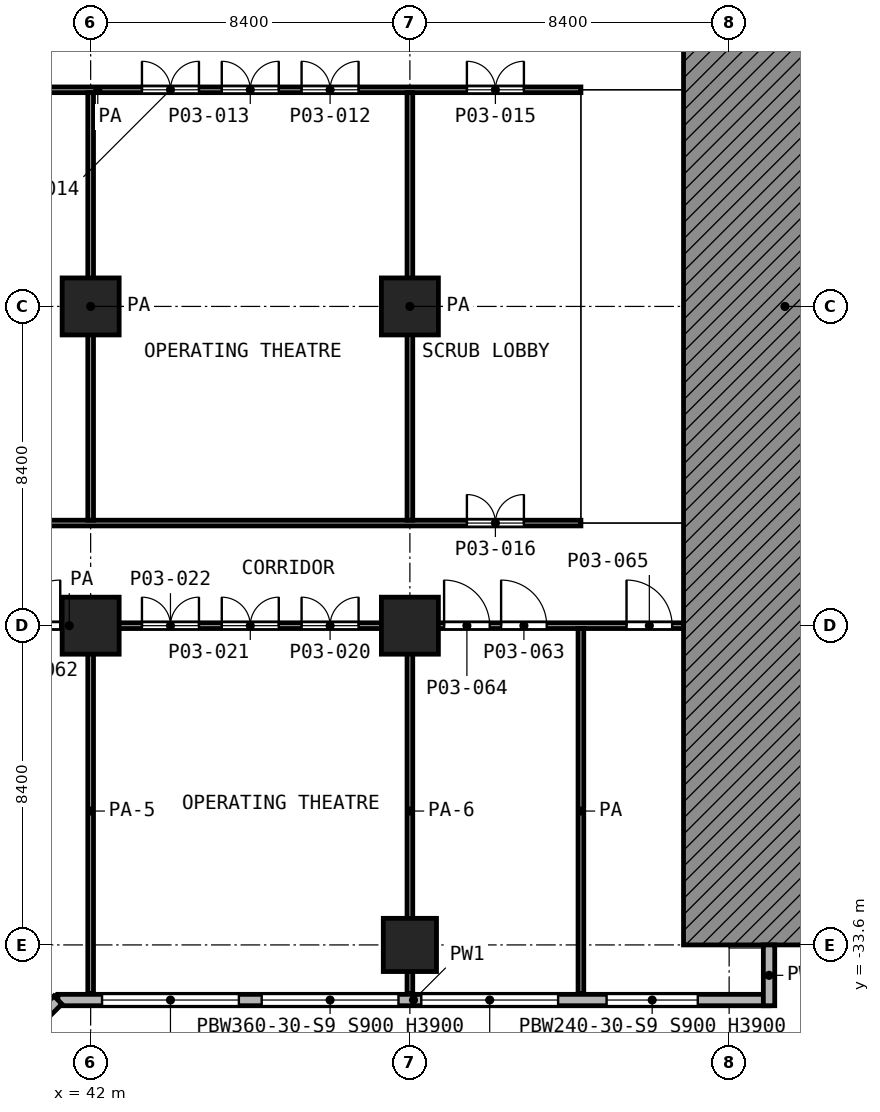
"""IFC4 building model, lengths in metres.
Left out: names, types, materials, properties, quantities, classifications, styles, units other than length and angle.
Written with IfcOpenShell. Run it as: python <this file> out.ifc"""

import sys

from ifc_helpers import new_model, si_unit, direction, frame, frame_2d, origin, origin_2d, place, context, subcontext, project, spatial, polyline, rectangle, outline, extrude, element, fill, save


model = new_model("IFC4")
c1 = context("Model", 3, precision=1e-05, world=origin(), true_north=direction((0.0, 1.0)))
c2 = subcontext(c1, "Body", "Model", "MODEL_VIEW")
j1 = project(units=[si_unit("LENGTHUNIT", "METRE"), si_unit("PLANEANGLEUNIT", "RADIAN")], contexts=[c1])
p1 = place(None, origin())
s1 = spatial("IfcSite", under=j1, at=p1, CompositionType="ELEMENT")
p2 = place(p1, origin())
s2 = spatial("IfcBuilding", under=s1, at=p2, CompositionType="ELEMENT")
p3 = place(p2, frame((0.0, 0.0, 12.6)))
s3 = spatial("IfcBuildingStorey", under=s2, at=p3, CompositionType="ELEMENT", Elevation=12.6)
for number, where, z_axis, x_axis in (
    (1, (42.0, -16.8, 0.0), (0.0, 0.0, 1.0), (1.0, 0.0, 0.0)),
    (2, (50.4, -16.8, 0.0), (0.0, 0.0, 1.0), (1.0, 0.0, 0.0)),
    (3, (42.0, -25.2, 0.0), (0.0, 0.0, 1.0), (1.0, 0.0, 0.0)),
    (4, (50.4, -25.2, 0.0), (0.0, 0.0, 1.0), (1.0, 0.0, 0.0)),
):
    element("IfcColumn", number, at=place(p3, frame(where, z_axis=z_axis, x_axis=x_axis)), inside=s3, PredefinedType="COLUMN", context=c2, shape_type="SweptSolid", body=[
        extrude(rectangle(XDim=1.5, YDim=1.5, at=origin_2d()), origin(), (0.0, 0.0, 1.0), 5.6),
    ])
p4 = place(p3, frame((50.4, -33.6, 0.0), z_axis=(0.0, 0.0, 1.0), x_axis=(1.0, 0.0, 0.0)))
e5 = element("IfcColumn", 5, at=p4, inside=s3, PredefinedType="COLUMN", context=c2, shape_type="SweptSolid", body=[
    extrude(rectangle(XDim=1.4, YDim=1.4, at=origin_2d()), origin(), (0.0, 0.0, 1.0), 5.6),
])
p5 = place(p3, frame((0.0, 0.0, -12.6), z_axis=(0.0, -1.0, 0.0), x_axis=(1.0, 0.0, 0.0)))
e6 = element("IfcWall", 6, at=p5, inside=s3, PredefinedType="SHEAR", context=c2, shape_type="SweptSolid", body=[
    extrude(outline(polyline([(62.938, 18.2), (62.484, 17.583), (61.414, 15.591), (60.634, 13.468), (60.448, 12.6), (57.6, 12.6), (57.6, 18.2), (62.938, 18.2)])), origin(), (0.0, 0.0, 1.0), 33.6),
])
p6 = place(p3, frame((35.05, -41.138, 0.0), z_axis=(0.0, 0.0, 1.0), x_axis=(0.707106781187, 0.707106781187, 0.0)))
e7 = element("IfcWall", 7, at=p6, inside=s3, PredefinedType="SOLIDWALL", context=c2, shape_type="SweptSolid", body=[
    extrude(rectangle(XDim=8.61, YDim=0.3, at=frame_2d((4.305, 0.0))), origin(), (0.0, 0.0, 1.0), 5.25),
])
p7 = place(p6, frame((2.34, 0.0, 0.9)))
e8 = element("IfcOpeningElement", 8, at=p7, cuts=e7, PredefinedType="OPENING", context=c2, shape_type="SweptSolid", body=[
    extrude(rectangle(XDim=1.2, YDim=3.0, at=frame_2d((0.6, 1.5))), frame((0.0, 0.16, 0.0), z_axis=(0.0, -1.0, 0.0), x_axis=(1.0, 0.0, 0.0)), (0.0, 0.0, 1.0), 0.32),
])
p8 = place(p6, frame((5.593, 0.0, 0.9)))
e9 = element("IfcOpeningElement", 9, at=p8, cuts=e7, PredefinedType="OPENING", context=c2, shape_type="SweptSolid", body=[
    extrude(rectangle(XDim=2.4, YDim=3.0, at=frame_2d((1.2, 1.5))), frame((0.0, 0.16, 0.0), z_axis=(0.0, -1.0, 0.0), x_axis=(1.0, 0.0, 0.0)), (0.0, 0.0, 1.0), 0.32),
])
p9 = place(p3, frame((41.138, -35.05, 0.0), z_axis=(0.0, 0.0, 1.0), x_axis=(1.0, 0.0, 0.0)))
e10 = element("IfcWall", 10, at=p9, inside=s3, PredefinedType="SOLIDWALL", context=c2, shape_type="SweptSolid", body=[
    extrude(rectangle(XDim=18.712, YDim=0.3, at=frame_2d((9.356, 0.0))), origin(), (0.0, 0.0, 1.0), 5.25),
])
p10 = place(p9, frame((1.162, 0.0, 0.9)))
e11 = element("IfcOpeningElement", 11, at=p10, cuts=e10, PredefinedType="OPENING", context=c2, shape_type="SweptSolid", body=[
    extrude(rectangle(XDim=3.6, YDim=3.0, at=frame_2d((1.8, 1.5))), frame((0.0, 0.16, 0.0), z_axis=(0.0, -1.0, 0.0), x_axis=(1.0, 0.0, 0.0)), (0.0, 0.0, 1.0), 0.32),
])
p11 = place(p9, frame((5.362, 0.0, 0.9)))
e12 = element("IfcOpeningElement", 12, at=p11, cuts=e10, PredefinedType="OPENING", context=c2, shape_type="SweptSolid", body=[
    extrude(rectangle(XDim=3.6, YDim=3.0, at=frame_2d((1.8, 1.5))), frame((0.0, 0.16, 0.0), z_axis=(0.0, -1.0, 0.0), x_axis=(1.0, 0.0, 0.0)), (0.0, 0.0, 1.0), 0.32),
])
p12 = place(p9, frame((9.562, 0.0, 0.9)))
e13 = element("IfcOpeningElement", 13, at=p12, cuts=e10, PredefinedType="OPENING", context=c2, shape_type="SweptSolid", body=[
    extrude(rectangle(XDim=3.6, YDim=3.0, at=frame_2d((1.8, 1.5))), frame((0.0, 0.16, 0.0), z_axis=(0.0, -1.0, 0.0), x_axis=(1.0, 0.0, 0.0)), (0.0, 0.0, 1.0), 0.32),
])
p13 = place(p9, frame((14.437, 0.0, 0.9)))
e14 = element("IfcOpeningElement", 14, at=p13, cuts=e10, PredefinedType="OPENING", context=c2, shape_type="SweptSolid", body=[
    extrude(rectangle(XDim=2.4, YDim=3.0, at=frame_2d((1.2, 1.5))), frame((0.0, 0.16, 0.0), z_axis=(0.0, -1.0, 0.0), x_axis=(1.0, 0.0, 0.0)), (0.0, 0.0, 1.0), 0.32),
])
p14 = place(p3, frame((59.85, -35.2, 0.0), z_axis=(0.0, 0.0, 1.0), x_axis=(0.0, 1.0, 0.0)))
e15 = element("IfcWall", 15, at=p14, inside=s3, PredefinedType="SOLIDWALL", context=c2, shape_type="SweptSolid", body=[
    extrude(rectangle(XDim=1.6, YDim=0.3, at=frame_2d((0.8, 0.0))), origin(), (0.0, 0.0, 1.0), 5.25),
])
p15 = place(p3, frame((25.275, -25.2, 0.0), z_axis=(0.0, 0.0, 1.0), x_axis=(1.0, 0.0, 0.0)))
e16 = element("IfcWall", 16, at=p15, inside=s3, PredefinedType="PARTITIONING", context=c2, shape_type="SweptSolid", body=[
    extrude(rectangle(XDim=32.325, YDim=0.15, at=frame_2d((16.163, 0.0))), origin(), (0.0, 0.0, 1.0), 5.25),
])
p16 = place(p15, frame((5.625, 0.0, 0.0)))
e17 = element("IfcOpeningElement", 17, at=p16, cuts=e16, PredefinedType="OPENING", context=c2, shape_type="SweptSolid", body=[
    extrude(rectangle(XDim=1.2, YDim=2.1, at=frame_2d((0.6, 1.05))), frame((0.0, 0.085, 0.0), z_axis=(0.0, -1.0, 0.0), x_axis=(1.0, 0.0, 0.0)), (0.0, 0.0, 1.0), 0.17),
])
p17 = place(p15, frame((10.125, 0.0, 0.0)))
e18 = element("IfcOpeningElement", 18, at=p17, cuts=e16, PredefinedType="OPENING", context=c2, shape_type="SweptSolid", body=[
    extrude(rectangle(XDim=1.2, YDim=2.1, at=frame_2d((0.6, 1.05))), frame((0.0, 0.085, 0.0), z_axis=(0.0, -1.0, 0.0), x_axis=(1.0, 0.0, 0.0)), (0.0, 0.0, 1.0), 0.17),
])
p18 = place(p15, frame((14.725, 0.0, 0.0)))
e19 = element("IfcOpeningElement", 19, at=p18, cuts=e16, PredefinedType="OPENING", context=c2, shape_type="SweptSolid", body=[
    extrude(rectangle(XDim=1.2, YDim=2.1, at=frame_2d((0.6, 1.05))), frame((0.0, 0.085, 0.0), z_axis=(0.0, -1.0, 0.0), x_axis=(1.0, 0.0, 0.0)), (0.0, 0.0, 1.0), 0.17),
])
p19 = place(p15, frame((13.325, 0.0, 0.0)))
e20 = element("IfcOpeningElement", 20, at=p19, cuts=e16, PredefinedType="OPENING", context=c2, shape_type="SweptSolid", body=[
    extrude(rectangle(XDim=1.1, YDim=2.1, at=frame_2d((0.55, 1.05))), frame((0.0, 0.085, 0.0), z_axis=(0.0, -1.0, 0.0), x_axis=(1.0, 0.0, 0.0)), (0.0, 0.0, 1.0), 0.17),
])
p20 = place(p15, frame((22.275, 0.0, 0.0)))
e21 = element("IfcOpeningElement", 21, at=p20, cuts=e16, PredefinedType="OPENING", context=c2, shape_type="SweptSolid", body=[
    extrude(rectangle(XDim=1.5, YDim=2.1, at=frame_2d((0.75, 1.05))), frame((0.0, 0.085, 0.0), z_axis=(0.0, -1.0, 0.0), x_axis=(1.0, 0.0, 0.0)), (0.0, 0.0, 1.0), 0.17),
])
p21 = place(p15, frame((20.175, 0.0, 0.0)))
e22 = element("IfcOpeningElement", 22, at=p21, cuts=e16, PredefinedType="OPENING", context=c2, shape_type="SweptSolid", body=[
    extrude(rectangle(XDim=1.5, YDim=2.1, at=frame_2d((0.75, 1.05))), frame((0.0, 0.085, 0.0), z_axis=(0.0, -1.0, 0.0), x_axis=(1.0, 0.0, 0.0)), (0.0, 0.0, 1.0), 0.17),
])
p22 = place(p15, frame((18.075, 0.0, 0.0)))
e23 = element("IfcOpeningElement", 23, at=p22, cuts=e16, PredefinedType="OPENING", context=c2, shape_type="SweptSolid", body=[
    extrude(rectangle(XDim=1.5, YDim=2.1, at=frame_2d((0.75, 1.05))), frame((0.0, 0.085, 0.0), z_axis=(0.0, -1.0, 0.0), x_axis=(1.0, 0.0, 0.0)), (0.0, 0.0, 1.0), 0.17),
])
p23 = place(p15, frame((27.525, 0.0, 0.0)))
e24 = element("IfcOpeningElement", 24, at=p23, cuts=e16, PredefinedType="OPENING", context=c2, shape_type="SweptSolid", body=[
    extrude(rectangle(XDim=1.2, YDim=2.1, at=frame_2d((0.6, 1.05))), frame((0.0, 0.085, 0.0), z_axis=(0.0, -1.0, 0.0), x_axis=(1.0, 0.0, 0.0)), (0.0, 0.0, 1.0), 0.17),
])
p24 = place(p15, frame((26.025, 0.0, 0.0)))
e25 = element("IfcOpeningElement", 25, at=p24, cuts=e16, PredefinedType="OPENING", context=c2, shape_type="SweptSolid", body=[
    extrude(rectangle(XDim=1.2, YDim=2.1, at=frame_2d((0.6, 1.05))), frame((0.0, 0.085, 0.0), z_axis=(0.0, -1.0, 0.0), x_axis=(1.0, 0.0, 0.0)), (0.0, 0.0, 1.0), 0.17),
])
p25 = place(p15, frame((30.825, 0.0, 0.0)))
e26 = element("IfcOpeningElement", 26, at=p25, cuts=e16, PredefinedType="OPENING", context=c2, shape_type="SweptSolid", body=[
    extrude(rectangle(XDim=1.2, YDim=2.1, at=frame_2d((0.6, 1.05))), frame((0.0, 0.085, 0.0), z_axis=(0.0, -1.0, 0.0), x_axis=(1.0, 0.0, 0.0)), (0.0, 0.0, 1.0), 0.17),
])
p26 = place(p3, frame((25.2, -22.5, 0.0), z_axis=(0.0, 0.0, 1.0), x_axis=(1.0, 0.0, 0.0)))
e27 = element("IfcWall", 27, at=p26, inside=s3, PredefinedType="PARTITIONING", context=c2, shape_type="SweptSolid", body=[
    extrude(rectangle(XDim=29.7, YDim=0.15, at=frame_2d((14.85, 0.0))), origin(), (0.0, 0.0, 1.0), 5.25),
])
p27 = place(p26, frame((12.1, 0.0, 0.0)))
e28 = element("IfcOpeningElement", 28, at=p27, cuts=e27, PredefinedType="OPENING", context=c2, shape_type="SweptSolid", body=[
    extrude(rectangle(XDim=1.0, YDim=2.1, at=frame_2d((0.5, 1.05))), frame((0.0, 0.085, 0.0), z_axis=(0.0, -1.0, 0.0), x_axis=(1.0, 0.0, 0.0)), (0.0, 0.0, 1.0), 0.17),
])
p28 = place(p26, frame((26.7, 0.0, 0.0)))
e29 = element("IfcOpeningElement", 29, at=p28, cuts=e27, PredefinedType="OPENING", context=c2, shape_type="SweptSolid", body=[
    extrude(rectangle(XDim=1.5, YDim=2.1, at=frame_2d((0.75, 1.05))), frame((0.0, 0.085, 0.0), z_axis=(0.0, -1.0, 0.0), x_axis=(1.0, 0.0, 0.0)), (0.0, 0.0, 1.0), 0.17),
])
p29 = place(p3, frame((29.475, -11.1, 0.0), z_axis=(0.0, 0.0, 1.0), x_axis=(1.0, 0.0, 0.0)))
e30 = element("IfcWall", 30, at=p29, inside=s3, PredefinedType="PARTITIONING", context=c2, shape_type="SweptSolid", body=[
    extrude(rectangle(XDim=25.425, YDim=0.15, at=frame_2d((12.712, 0.0))), origin(), (0.0, 0.0, 1.0), 5.25),
])
p30 = place(p29, frame((18.075, 0.0, 0.0)))
e31 = element("IfcOpeningElement", 31, at=p30, cuts=e30, PredefinedType="OPENING", context=c2, shape_type="SweptSolid", body=[
    extrude(rectangle(XDim=1.5, YDim=2.1, at=frame_2d((0.75, 1.05))), frame((0.0, 0.085, 0.0), z_axis=(0.0, -1.0, 0.0), x_axis=(1.0, 0.0, 0.0)), (0.0, 0.0, 1.0), 0.17),
])
p31 = place(p29, frame((15.975, 0.0, 0.0)))
e32 = element("IfcOpeningElement", 32, at=p31, cuts=e30, PredefinedType="OPENING", context=c2, shape_type="SweptSolid", body=[
    extrude(rectangle(XDim=1.5, YDim=2.1, at=frame_2d((0.75, 1.05))), frame((0.0, 0.085, 0.0), z_axis=(0.0, -1.0, 0.0), x_axis=(1.0, 0.0, 0.0)), (0.0, 0.0, 1.0), 0.17),
])
p32 = place(p29, frame((13.875, 0.0, 0.0)))
e33 = element("IfcOpeningElement", 33, at=p32, cuts=e30, PredefinedType="OPENING", context=c2, shape_type="SweptSolid", body=[
    extrude(rectangle(XDim=1.5, YDim=2.1, at=frame_2d((0.75, 1.05))), frame((0.0, 0.085, 0.0), z_axis=(0.0, -1.0, 0.0), x_axis=(1.0, 0.0, 0.0)), (0.0, 0.0, 1.0), 0.17),
])
p33 = place(p29, frame((22.425, 0.0, 0.0)))
e34 = element("IfcOpeningElement", 34, at=p33, cuts=e30, PredefinedType="OPENING", context=c2, shape_type="SweptSolid", body=[
    extrude(rectangle(XDim=1.5, YDim=2.1, at=frame_2d((0.75, 1.05))), frame((0.0, 0.085, 0.0), z_axis=(0.0, -1.0, 0.0), x_axis=(1.0, 0.0, 0.0)), (0.0, 0.0, 1.0), 0.17),
])
p34 = place(p29, frame((1.525, 0.0, 0.0)))
e35 = element("IfcOpeningElement", 35, at=p34, cuts=e30, PredefinedType="OPENING", context=c2, shape_type="SweptSolid", body=[
    extrude(rectangle(XDim=1.0, YDim=2.1, at=frame_2d((0.5, 1.05))), frame((0.0, 0.085, 0.0), z_axis=(0.0, -1.0, 0.0), x_axis=(1.0, 0.0, 0.0)), (0.0, 0.0, 1.0), 0.17),
])
p35 = place(p3, frame((42.0, -34.88, 0.0), z_axis=(0.0, 0.0, 1.0), x_axis=(0.0, 1.0, 0.0)))
e36 = element("IfcWall", 36, at=p35, inside=s3, PredefinedType="PARTITIONING", context=c2, shape_type="SweptSolid", body=[
    extrude(rectangle(XDim=9.605, YDim=0.15, at=frame_2d((4.802, 0.0))), origin(), (0.0, 0.0, 1.0), 3.85),
])
p36 = place(p3, frame((42.0, -22.425, 0.0), z_axis=(0.0, 0.0, 1.0), x_axis=(0.0, 1.0, 0.0)))
e37 = element("IfcWall", 37, at=p36, inside=s3, PredefinedType="PARTITIONING", context=c2, shape_type="SweptSolid", body=[
    extrude(rectangle(XDim=11.25, YDim=0.15, at=frame_2d((5.625, 0.0))), origin(), (0.0, 0.0, 1.0), 5.25),
])
p37 = place(p3, frame((50.4, -34.88, 0.0), z_axis=(0.0, 0.0, 1.0), x_axis=(0.0, 1.0, 0.0)))
e38 = element("IfcWall", 38, at=p37, inside=s3, PredefinedType="PARTITIONING", context=c2, shape_type="SweptSolid", body=[
    extrude(rectangle(XDim=9.605, YDim=0.15, at=frame_2d((4.802, 0.0))), origin(), (0.0, 0.0, 1.0), 4.35),
])
p38 = place(p3, frame((50.4, -22.425, 0.0), z_axis=(0.0, 0.0, 1.0), x_axis=(0.0, 1.0, 0.0)))
e39 = element("IfcWall", 39, at=p38, inside=s3, PredefinedType="PARTITIONING", context=c2, shape_type="SweptSolid", body=[
    extrude(rectangle(XDim=11.25, YDim=0.15, at=frame_2d((5.625, 0.0))), origin(), (0.0, 0.0, 1.0), 5.25),
])
p39 = place(p3, frame((54.9, -34.88, 0.0), z_axis=(0.0, 0.0, 1.0), x_axis=(0.0, 1.0, 0.0)))
e40 = element("IfcWall", 40, at=p39, inside=s3, PredefinedType="PARTITIONING", context=c2, shape_type="SweptSolid", body=[
    extrude(rectangle(XDim=9.605, YDim=0.15, at=frame_2d((4.802, 0.0))), origin(), (0.0, 0.0, 1.0), 5.25),
])
p40 = place(p10, origin())
e41 = element("IfcWindow", 41, at=p40, inside=s3, PartitioningType="SINGLE_PANEL", PredefinedType="WINDOW", context=c2, shape_type="SweptSolid", body=[
    extrude(rectangle(XDim=3.6, YDim=3.0, at=frame_2d((1.8, 1.5))), frame((0.0, 0.03, 0.0), z_axis=(0.0, -1.0, 0.0), x_axis=(1.0, 0.0, 0.0)), (0.0, 0.0, 1.0), 0.06),
])
fill(e11, e41)
p41 = place(p11, origin())
e42 = element("IfcWindow", 42, at=p41, inside=s3, PartitioningType="SINGLE_PANEL", PredefinedType="WINDOW", context=c2, shape_type="SweptSolid", body=[
    extrude(rectangle(XDim=3.6, YDim=3.0, at=frame_2d((1.8, 1.5))), frame((0.0, 0.03, 0.0), z_axis=(0.0, -1.0, 0.0), x_axis=(1.0, 0.0, 0.0)), (0.0, 0.0, 1.0), 0.06),
])
fill(e12, e42)
p42 = place(p12, origin())
e43 = element("IfcWindow", 43, at=p42, inside=s3, PartitioningType="SINGLE_PANEL", PredefinedType="WINDOW", context=c2, shape_type="SweptSolid", body=[
    extrude(rectangle(XDim=3.6, YDim=3.0, at=frame_2d((1.8, 1.5))), frame((0.0, 0.03, 0.0), z_axis=(0.0, -1.0, 0.0), x_axis=(1.0, 0.0, 0.0)), (0.0, 0.0, 1.0), 0.06),
])
fill(e13, e43)
p43 = place(p13, origin())
e44 = element("IfcWindow", 44, at=p43, inside=s3, PartitioningType="SINGLE_PANEL", PredefinedType="WINDOW", context=c2, shape_type="SweptSolid", body=[
    extrude(rectangle(XDim=2.4, YDim=3.0, at=frame_2d((1.2, 1.5))), frame((0.0, 0.03, 0.0), z_axis=(0.0, -1.0, 0.0), x_axis=(1.0, 0.0, 0.0)), (0.0, 0.0, 1.0), 0.06),
])
fill(e14, e44)
p44 = place(p30, origin())
e45 = element("IfcDoor", 45, at=p44, inside=s3, OperationType="DOUBLE_DOOR_SINGLE_SWING", PredefinedType="DOOR", context=c2, shape_type="SweptSolid", body=[
    extrude(rectangle(XDim=1.5, YDim=2.1, at=frame_2d((0.75, 1.05))), frame((0.0, 0.025, 0.0), z_axis=(0.0, -1.0, 0.0), x_axis=(1.0, 0.0, 0.0)), (0.0, 0.0, 1.0), 0.05),
])
fill(e31, e45)
p45 = place(p31, origin())
e46 = element("IfcDoor", 46, at=p45, inside=s3, OperationType="DOUBLE_DOOR_SINGLE_SWING", PredefinedType="DOOR", context=c2, shape_type="SweptSolid", body=[
    extrude(rectangle(XDim=1.5, YDim=2.1, at=frame_2d((0.75, 1.05))), frame((0.0, 0.025, 0.0), z_axis=(0.0, -1.0, 0.0), x_axis=(1.0, 0.0, 0.0)), (0.0, 0.0, 1.0), 0.05),
])
fill(e32, e46)
p46 = place(p32, origin())
e47 = element("IfcDoor", 47, at=p46, inside=s3, OperationType="DOUBLE_DOOR_SINGLE_SWING", PredefinedType="DOOR", context=c2, shape_type="SweptSolid", body=[
    extrude(rectangle(XDim=1.5, YDim=2.1, at=frame_2d((0.75, 1.05))), frame((0.0, 0.025, 0.0), z_axis=(0.0, -1.0, 0.0), x_axis=(1.0, 0.0, 0.0)), (0.0, 0.0, 1.0), 0.05),
])
fill(e33, e47)
p47 = place(p33, origin())
e48 = element("IfcDoor", 48, at=p47, inside=s3, OperationType="DOUBLE_DOOR_SINGLE_SWING", PredefinedType="DOOR", context=c2, shape_type="SweptSolid", body=[
    extrude(rectangle(XDim=1.5, YDim=2.1, at=frame_2d((0.75, 1.05))), frame((0.0, 0.025, 0.0), z_axis=(0.0, -1.0, 0.0), x_axis=(1.0, 0.0, 0.0)), (0.0, 0.0, 1.0), 0.05),
])
fill(e34, e48)
p48 = place(p28, origin())
e49 = element("IfcDoor", 49, at=p48, inside=s3, OperationType="DOUBLE_DOOR_SINGLE_SWING", PredefinedType="DOOR", context=c2, shape_type="SweptSolid", body=[
    extrude(rectangle(XDim=1.5, YDim=2.1, at=frame_2d((0.75, 1.05))), frame((0.0, 0.025, 0.0), z_axis=(0.0, -1.0, 0.0), x_axis=(1.0, 0.0, 0.0)), (0.0, 0.0, 1.0), 0.05),
])
fill(e29, e49)
p49 = place(p18, origin())
e50 = element("IfcDoor", 50, at=p49, inside=s3, OperationType="SINGLE_SWING_RIGHT", PredefinedType="DOOR", context=c2, shape_type="SweptSolid", body=[
    extrude(rectangle(XDim=1.2, YDim=2.1, at=frame_2d((0.6, 1.05))), frame((0.0, 0.025, 0.0), z_axis=(0.0, -1.0, 0.0), x_axis=(1.0, 0.0, 0.0)), (0.0, 0.0, 1.0), 0.05),
])
fill(e19, e50)
p50 = place(p20, origin())
e51 = element("IfcDoor", 51, at=p50, inside=s3, OperationType="DOUBLE_DOOR_SINGLE_SWING", PredefinedType="DOOR", context=c2, shape_type="SweptSolid", body=[
    extrude(rectangle(XDim=1.5, YDim=2.1, at=frame_2d((0.75, 1.05))), frame((0.0, 0.025, 0.0), z_axis=(0.0, -1.0, 0.0), x_axis=(1.0, 0.0, 0.0)), (0.0, 0.0, 1.0), 0.05),
])
fill(e21, e51)
p51 = place(p21, origin())
e52 = element("IfcDoor", 52, at=p51, inside=s3, OperationType="DOUBLE_DOOR_SINGLE_SWING", PredefinedType="DOOR", context=c2, shape_type="SweptSolid", body=[
    extrude(rectangle(XDim=1.5, YDim=2.1, at=frame_2d((0.75, 1.05))), frame((0.0, 0.025, 0.0), z_axis=(0.0, -1.0, 0.0), x_axis=(1.0, 0.0, 0.0)), (0.0, 0.0, 1.0), 0.05),
])
fill(e22, e52)
p52 = place(p22, origin())
e53 = element("IfcDoor", 53, at=p52, inside=s3, OperationType="DOUBLE_DOOR_SINGLE_SWING", PredefinedType="DOOR", context=c2, shape_type="SweptSolid", body=[
    extrude(rectangle(XDim=1.5, YDim=2.1, at=frame_2d((0.75, 1.05))), frame((0.0, 0.025, 0.0), z_axis=(0.0, -1.0, 0.0), x_axis=(1.0, 0.0, 0.0)), (0.0, 0.0, 1.0), 0.05),
])
fill(e23, e53)
p53 = place(p23, origin())
e54 = element("IfcDoor", 54, at=p53, inside=s3, OperationType="SINGLE_SWING_LEFT", PredefinedType="DOOR", context=c2, shape_type="SweptSolid", body=[
    extrude(rectangle(XDim=1.2, YDim=2.1, at=frame_2d((0.6, 1.05))), frame((0.0, 0.025, 0.0), z_axis=(0.0, -1.0, 0.0), x_axis=(1.0, 0.0, 0.0)), (0.0, 0.0, 1.0), 0.05),
])
fill(e24, e54)
p54 = place(p24, origin())
e55 = element("IfcDoor", 55, at=p54, inside=s3, OperationType="SINGLE_SWING_LEFT", PredefinedType="DOOR", context=c2, shape_type="SweptSolid", body=[
    extrude(rectangle(XDim=1.2, YDim=2.1, at=frame_2d((0.6, 1.05))), frame((0.0, 0.025, 0.0), z_axis=(0.0, -1.0, 0.0), x_axis=(1.0, 0.0, 0.0)), (0.0, 0.0, 1.0), 0.05),
])
fill(e25, e55)
p55 = place(p25, origin())
e56 = element("IfcDoor", 56, at=p55, inside=s3, OperationType="SINGLE_SWING_LEFT", PredefinedType="DOOR", context=c2, shape_type="SweptSolid", body=[
    extrude(rectangle(XDim=1.2, YDim=2.1, at=frame_2d((0.6, 1.05))), frame((0.0, 0.025, 0.0), z_axis=(0.0, -1.0, 0.0), x_axis=(1.0, 0.0, 0.0)), (0.0, 0.0, 1.0), 0.05),
])
fill(e26, e56)
save(model, sys.argv[1])
